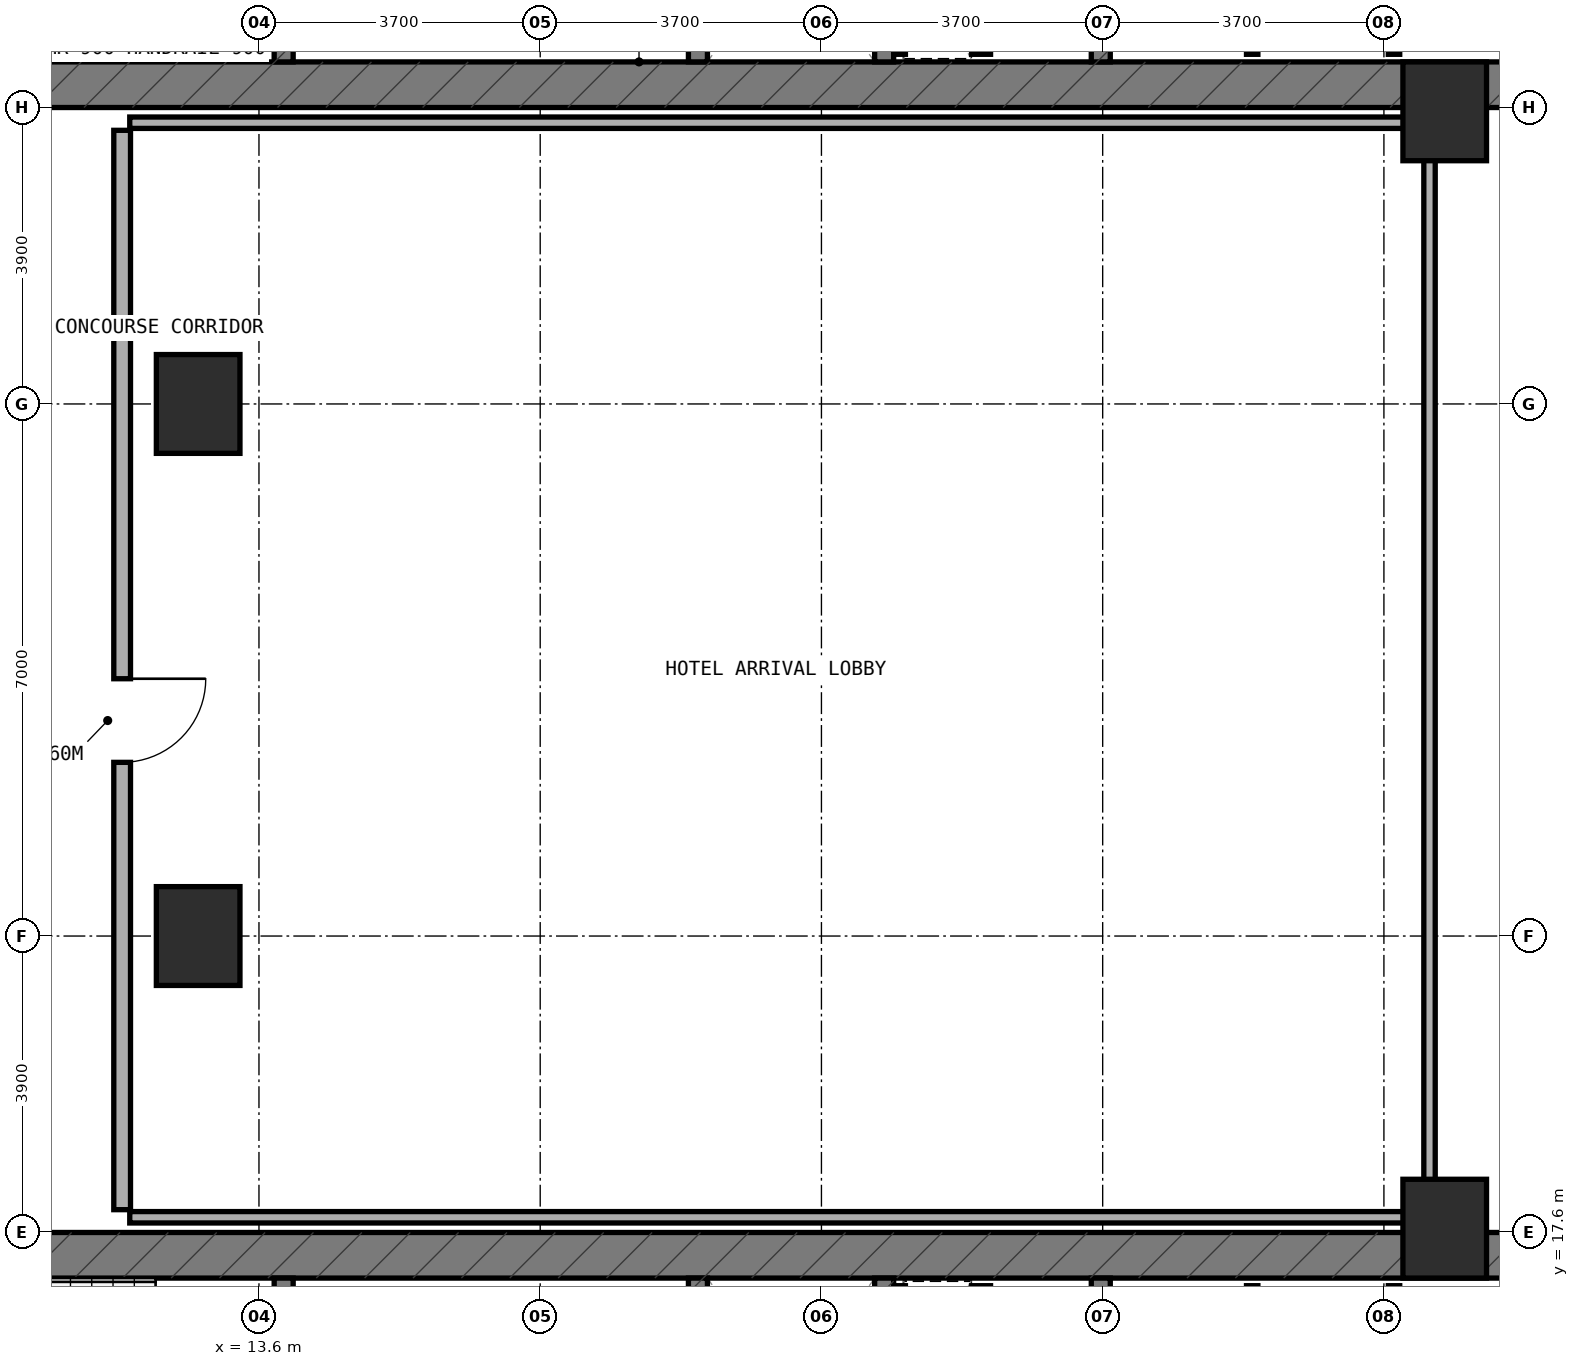
"""IFC4 building model, lengths in metres.
Left out: names, types, materials, properties, quantities, classifications, styles, units other than length and angle.
Written with IfcOpenShell. Run it as: python <this file> out.ifc"""

import sys

from ifc_helpers import new_model, si_unit, direction, frame, frame_2d, origin, origin_2d, place, context, subcontext, project, spatial, rectangle, extrude, element, fill, save


model = new_model("IFC4")
c1 = context("Model", 3, precision=1e-05, world=origin(), true_north=direction((0.0, 1.0)))
c2 = subcontext(c1, "Body", "Model", "MODEL_VIEW")
j1 = project(units=[si_unit("LENGTHUNIT", "METRE"), si_unit("PLANEANGLEUNIT", "RADIAN")], contexts=[c1])
p1 = place(None, origin())
s1 = spatial("IfcSite", under=j1, at=p1, CompositionType="ELEMENT")
p2 = place(p1, origin())
s2 = spatial("IfcBuilding", under=s1, at=p2, CompositionType="ELEMENT")
p3 = place(p2, origin())
s3 = spatial("IfcBuildingStorey", under=s2, at=p3, CompositionType="ELEMENT", Elevation=0.0)
p4 = place(p3, frame((6.2, 32.7, 0.0), z_axis=(0.0, 0.0, 1.0), x_axis=(1.0, 0.0, 0.0)))
e1 = element("IfcWall", 1, at=p4, inside=s3, PredefinedType="SHEAR", context=c2, shape_type="SweptSolid", body=[
    extrude(rectangle(XDim=24.8, YDim=0.6, at=frame_2d((12.4, 0.0))), origin(), (0.0, 0.0, 1.0), 5.4),
])
p5 = place(p3, frame((13.925, 33.0, 0.0), z_axis=(0.0, 0.0, 1.0), x_axis=(0.0, 1.0, 0.0)))
e2 = element("IfcWall", 2, at=p5, inside=s3, PredefinedType="STANDARD", context=c2, shape_type="SweptSolid", body=[
    extrude(rectangle(XDim=3.16, YDim=0.25, at=frame_2d((1.58, 0.0))), origin(), (0.0, 0.0, 1.0), 5.05),
])
p6 = place(p5, frame((0.98, 0.0, 0.0)))
e3 = element("IfcOpeningElement", 3, at=p6, cuts=e2, PredefinedType="OPENING", context=c2, shape_type="SweptSolid", body=[
    extrude(rectangle(XDim=1.1, YDim=2.15, at=frame_2d((0.55, 1.075))), frame((0.0, 0.135, 0.0), z_axis=(0.0, -1.0, 0.0), x_axis=(1.0, 0.0, 0.0)), (0.0, 0.0, 1.0), 0.27),
])
p7 = place(p3, frame((19.375, 33.0, 0.0), z_axis=(0.0, 0.0, 1.0), x_axis=(0.0, 1.0, 0.0)))
e4 = element("IfcWall", 4, at=p7, inside=s3, PredefinedType="STANDARD", context=c2, shape_type="SweptSolid", body=[
    extrude(rectangle(XDim=3.16, YDim=0.25, at=frame_2d((1.58, 0.0))), origin(), (0.0, 0.0, 1.0), 5.05),
])
p8 = place(p7, frame((0.98, 0.0, 0.0)))
e5 = element("IfcOpeningElement", 5, at=p8, cuts=e4, PredefinedType="OPENING", context=c2, shape_type="SweptSolid", body=[
    extrude(rectangle(XDim=1.1, YDim=2.15, at=frame_2d((0.55, 1.075))), frame((0.0, 0.135, 0.0), z_axis=(0.0, -1.0, 0.0), x_axis=(1.0, 0.0, 0.0)), (0.0, 0.0, 1.0), 0.27),
])
for number, where, z_axis, x_axis in (
    (6, (21.825, 33.0, 0.0), (0.0, 0.0, 1.0), (0.0, 1.0, 0.0)),
    (7, (24.675, 33.0, 0.0), (0.0, 0.0, 1.0), (0.0, 1.0, 0.0)),
):
    element("IfcWall", number, at=place(p3, frame(where, z_axis=z_axis, x_axis=x_axis)), inside=s3, PredefinedType="STANDARD", context=c2, shape_type="SweptSolid", body=[
        extrude(rectangle(XDim=3.16, YDim=0.25, at=frame_2d((1.58, 0.0))), origin(), (0.0, 0.0, 1.0), 5.05),
    ])
p9 = place(p3, frame((6.2, 17.3, 0.0), z_axis=(0.0, 0.0, 1.0), x_axis=(1.0, 0.0, 0.0)))
e8 = element("IfcWall", 8, at=p9, inside=s3, PredefinedType="SHEAR", context=c2, shape_type="SweptSolid", body=[
    extrude(rectangle(XDim=24.8, YDim=0.6, at=frame_2d((12.4, 0.0))), origin(), (0.0, 0.0, 1.0), 5.4),
])
p10 = place(p3, frame((13.925, 13.84, 0.0), z_axis=(0.0, 0.0, 1.0), x_axis=(0.0, 1.0, 0.0)))
e9 = element("IfcWall", 9, at=p10, inside=s3, PredefinedType="STANDARD", context=c2, shape_type="SweptSolid", body=[
    extrude(rectangle(XDim=3.16, YDim=0.25, at=frame_2d((1.58, 0.0))), origin(), (0.0, 0.0, 1.0), 5.05),
])
p11 = place(p10, frame((0.98, 0.0, 0.0)))
e10 = element("IfcOpeningElement", 10, at=p11, cuts=e9, PredefinedType="OPENING", context=c2, shape_type="SweptSolid", body=[
    extrude(rectangle(XDim=1.1, YDim=2.15, at=frame_2d((0.55, 1.075))), frame((0.0, 0.135, 0.0), z_axis=(0.0, -1.0, 0.0), x_axis=(1.0, 0.0, 0.0)), (0.0, 0.0, 1.0), 0.27),
])
p12 = place(p3, frame((19.375, 13.84, 0.0), z_axis=(0.0, 0.0, 1.0), x_axis=(0.0, 1.0, 0.0)))
e11 = element("IfcWall", 11, at=p12, inside=s3, PredefinedType="STANDARD", context=c2, shape_type="SweptSolid", body=[
    extrude(rectangle(XDim=3.16, YDim=0.25, at=frame_2d((1.58, 0.0))), origin(), (0.0, 0.0, 1.0), 5.05),
])
p13 = place(p12, frame((0.98, 0.0, 0.0)))
e12 = element("IfcOpeningElement", 12, at=p13, cuts=e11, PredefinedType="OPENING", context=c2, shape_type="SweptSolid", body=[
    extrude(rectangle(XDim=1.1, YDim=2.15, at=frame_2d((0.55, 1.075))), frame((0.0, 0.135, 0.0), z_axis=(0.0, -1.0, 0.0), x_axis=(1.0, 0.0, 0.0)), (0.0, 0.0, 1.0), 0.27),
])
for number, where, z_axis, x_axis in (
    (13, (21.825, 13.84, 0.0), (0.0, 0.0, 1.0), (0.0, 1.0, 0.0)),
    (14, (24.675, 13.84, 0.0), (0.0, 0.0, 1.0), (0.0, 1.0, 0.0)),
):
    element("IfcWall", number, at=place(p3, frame(where, z_axis=z_axis, x_axis=x_axis)), inside=s3, PredefinedType="STANDARD", context=c2, shape_type="SweptSolid", body=[
        extrude(rectangle(XDim=3.16, YDim=0.25, at=frame_2d((1.58, 0.0))), origin(), (0.0, 0.0, 1.0), 5.05),
    ])
for number, where, z_axis, x_axis in (
    (15, (12.8, 21.5, 0.0), (0.0, 0.0, 1.0), (1.0, 0.0, 0.0)),
    (16, (12.8, 28.5, 0.0), (0.0, 0.0, 1.0), (1.0, 0.0, 0.0)),
    (17, (29.2, 17.65, 0.0), (0.0, 0.0, 1.0), (1.0, 0.0, 0.0)),
    (18, (29.2, 32.35, 0.0), (0.0, 0.0, 1.0), (1.0, 0.0, 0.0)),
):
    element("IfcColumn", number, at=place(p3, frame(where, z_axis=z_axis, x_axis=x_axis)), inside=s3, PredefinedType="COLUMN", context=c2, shape_type="SweptSolid", body=[
        extrude(rectangle(XDim=1.1, YDim=1.3, at=origin_2d()), origin(), (0.0, 0.0, 1.0), 5.4),
    ])
p14 = place(p3, frame((22.03, 33.1, 0.0), z_axis=(0.0, 0.0, 1.0), x_axis=(0.0, 1.0, 0.0)))
e19 = element("IfcWall", 19, at=p14, inside=s3, PredefinedType="PARTITIONING", context=c2, shape_type="SweptSolid", body=[
    extrude(rectangle(XDim=1.62, YDim=0.15, at=frame_2d((0.81, 0.0))), origin(), (0.0, 0.0, 1.0), 5.05),
])
p15 = place(p3, frame((23.1, 33.1, 0.0), z_axis=(0.0, 0.0, 1.0), x_axis=(0.0, 1.0, 0.0)))
e20 = element("IfcWall", 20, at=p15, inside=s3, PredefinedType="SOLIDWALL", context=c2, shape_type="SweptSolid", body=[
    extrude(rectangle(XDim=1.62, YDim=0.25, at=frame_2d((0.81, 0.0))), origin(), (0.0, 0.0, 1.0), 5.05),
])
p16 = place(p3, frame((26.667, 33.1, 0.0), z_axis=(0.0, 0.0, 1.0), x_axis=(0.0, 1.0, 0.0)))
e21 = element("IfcWall", 21, at=p16, inside=s3, PredefinedType="PARTITIONING", context=c2, shape_type="SweptSolid", body=[
    extrude(rectangle(XDim=2.96, YDim=0.15, at=frame_2d((1.48, 0.0))), origin(), (0.0, 0.0, 1.0), 5.05),
])
p17 = place(p3, frame((28.533, 33.1, 0.0), z_axis=(0.0, 0.0, 1.0), x_axis=(0.0, 1.0, 0.0)))
e22 = element("IfcWall", 22, at=p17, inside=s3, PredefinedType="PARTITIONING", context=c2, shape_type="SweptSolid", body=[
    extrude(rectangle(XDim=2.96, YDim=0.15, at=frame_2d((1.48, 0.0))), origin(), (0.0, 0.0, 1.0), 4.125),
])
p18 = place(p3, frame((22.03, 15.28, 0.0), z_axis=(0.0, 0.0, 1.0), x_axis=(0.0, 1.0, 0.0)))
e23 = element("IfcWall", 23, at=p18, inside=s3, PredefinedType="PARTITIONING", context=c2, shape_type="SweptSolid", body=[
    extrude(rectangle(XDim=1.62, YDim=0.15, at=frame_2d((0.81, 0.0))), origin(), (0.0, 0.0, 1.0), 5.05),
])
p19 = place(p3, frame((23.1, 15.28, 0.0), z_axis=(0.0, 0.0, 1.0), x_axis=(0.0, 1.0, 0.0)))
e24 = element("IfcWall", 24, at=p19, inside=s3, PredefinedType="SOLIDWALL", context=c2, shape_type="SweptSolid", body=[
    extrude(rectangle(XDim=1.62, YDim=0.25, at=frame_2d((0.81, 0.0))), origin(), (0.0, 0.0, 1.0), 5.05),
])
p20 = place(p3, frame((26.667, 13.94, 0.0), z_axis=(0.0, 0.0, 1.0), x_axis=(0.0, 1.0, 0.0)))
e25 = element("IfcWall", 25, at=p20, inside=s3, PredefinedType="PARTITIONING", context=c2, shape_type="SweptSolid", body=[
    extrude(rectangle(XDim=2.96, YDim=0.15, at=frame_2d((1.48, 0.0))), origin(), (0.0, 0.0, 1.0), 5.05),
])
p21 = place(p3, frame((28.533, 13.94, 0.0), z_axis=(0.0, 0.0, 1.0), x_axis=(0.0, 1.0, 0.0)))
e26 = element("IfcWall", 26, at=p21, inside=s3, PredefinedType="PARTITIONING", context=c2, shape_type="SweptSolid", body=[
    extrude(rectangle(XDim=2.96, YDim=0.15, at=frame_2d((1.48, 0.0))), origin(), (0.0, 0.0, 1.0), 4.125),
])
p22 = place(p3, frame((29.0, 17.9, 0.0), z_axis=(0.0, 0.0, 1.0), x_axis=(0.0, 1.0, 0.0)))
e27 = element("IfcWall", 27, at=p22, inside=s3, PredefinedType="PARTITIONING", context=c2, shape_type="SweptSolid", body=[
    extrude(rectangle(XDim=14.2, YDim=0.15, at=frame_2d((7.1, 0.0))), origin(), (0.0, 0.0, 1.0), 4.025),
])
for number, where, z_axis, x_axis in (
    (28, (11.9, 17.8, 0.0), (0.0, 0.0, 1.0), (1.0, 0.0, 0.0)),
    (29, (11.9, 32.2, 0.0), (0.0, 0.0, 1.0), (1.0, 0.0, 0.0)),
):
    element("IfcWall", number, at=place(p3, frame(where, z_axis=z_axis, x_axis=x_axis)), inside=s3, PredefinedType="PARTITIONING", context=c2, shape_type="SweptSolid", body=[
        extrude(rectangle(XDim=17.0, YDim=0.15, at=frame_2d((8.5, 0.0))), origin(), (0.0, 0.0, 1.0), 5.05),
    ])
p23 = place(p3, frame((11.8, 17.9, 0.0), z_axis=(0.0, 0.0, 1.0), x_axis=(0.0, 1.0, 0.0)))
e30 = element("IfcWall", 30, at=p23, inside=s3, PredefinedType="SOLIDWALL", context=c2, shape_type="SweptSolid", body=[
    extrude(rectangle(XDim=14.2, YDim=0.22, at=frame_2d((7.1, 0.0))), origin(), (0.0, 0.0, 1.0), 4.125),
])
p24 = place(p23, frame((5.885, 0.0, 0.0)))
e31 = element("IfcOpeningElement", 31, at=p24, cuts=e30, PredefinedType="OPENING", context=c2, shape_type="SweptSolid", body=[
    extrude(rectangle(XDim=1.1, YDim=2.1, at=frame_2d((0.55, 1.05))), frame((0.0, 0.12, 0.0), z_axis=(0.0, -1.0, 0.0), x_axis=(1.0, 0.0, 0.0)), (0.0, 0.0, 1.0), 0.24),
])
p25 = place(p24, frame((1.1, 0.0, 0.0), z_axis=(0.0, 0.0, 1.0), x_axis=(-1.0, 0.0, 0.0)))
e32 = element("IfcDoor", 32, at=p25, inside=s3, OperationType="SINGLE_SWING_LEFT", PredefinedType="DOOR", context=c2, shape_type="SweptSolid", body=[
    extrude(rectangle(XDim=1.1, YDim=2.1, at=frame_2d((0.55, 1.05))), frame((0.0, 0.025, 0.0), z_axis=(0.0, -1.0, 0.0), x_axis=(1.0, 0.0, 0.0)), (0.0, 0.0, 1.0), 0.05),
])
fill(e31, e32)
save(model, sys.argv[1])
